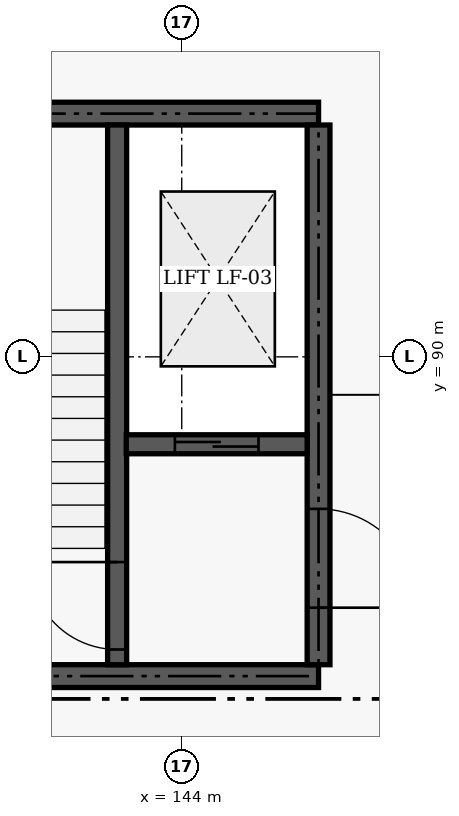
"""IFC4 building model, lengths in metres.
Left out: names, types, materials, properties, quantities, classifications, styles, units other than length and angle.
Written with IfcOpenShell. Run it as: python <this file> out.ifc"""

import sys

from ifc_helpers import new_model, si_unit, direction, frame, frame_2d, origin, place, context, subcontext, project, spatial, rectangle, extrude, element, fill, save


model = new_model("IFC4")
c1 = context("Model", 3, precision=1e-05, world=origin(), true_north=direction((0.0, 1.0)))
c2 = subcontext(c1, "Body", "Model", "MODEL_VIEW")
j1 = project(units=[si_unit("LENGTHUNIT", "METRE"), si_unit("PLANEANGLEUNIT", "RADIAN")], contexts=[c1])
p1 = place(None, origin())
s1 = spatial("IfcSite", under=j1, at=p1, CompositionType="ELEMENT")
p2 = place(p1, origin())
s2 = spatial("IfcBuilding", under=s1, at=p2, CompositionType="ELEMENT")
p3 = place(p2, frame((0.0, 0.0, 5.4)))
s3 = spatial("IfcBuildingStorey", under=s2, at=p3, CompositionType="ELEMENT", Elevation=5.4)
for number, where, z_axis, x_axis in (
    (1, (139.2, 85.8, 0.0), (0.0, 0.0, 1.0), (1.0, 0.0, 0.0)),
    (2, (139.2, 93.2, 0.0), (0.0, 0.0, 1.0), (1.0, 0.0, 0.0)),
):
    element("IfcWall", number, at=place(p3, frame(where, z_axis=z_axis, x_axis=x_axis)), inside=s3, PredefinedType="SHEAR", context=c2, shape_type="SweptSolid", body=[
        extrude(rectangle(XDim=6.6, YDim=0.3, at=frame_2d((3.3, 0.0))), origin(), (0.0, 0.0, 1.0), 4.2),
    ])
p4 = place(p3, frame((145.8, 85.95, 0.0), z_axis=(0.0, 0.0, 1.0), x_axis=(0.0, 1.0, 0.0)))
e3 = element("IfcWall", 3, at=p4, inside=s3, PredefinedType="SHEAR", context=c2, shape_type="SweptSolid", body=[
    extrude(rectangle(XDim=7.1, YDim=0.3, at=frame_2d((3.55, 0.0))), origin(), (0.0, 0.0, 1.0), 4.2),
])
p5 = place(p4, frame((0.75, 0.0, 0.0)))
e4 = element("IfcOpeningElement", 4, at=p5, cuts=e3, PredefinedType="OPENING", context=c2, shape_type="SweptSolid", body=[
    extrude(rectangle(XDim=1.3, YDim=2.15, at=frame_2d((0.65, 1.075))), frame((0.0, 0.16, 0.0), z_axis=(0.0, -1.0, 0.0), x_axis=(1.0, 0.0, 0.0)), (0.0, 0.0, 1.0), 0.32),
])
p6 = place(p3, frame((143.15, 85.95, 0.0), z_axis=(0.0, 0.0, 1.0), x_axis=(0.0, 1.0, 0.0)))
e5 = element("IfcWall", 5, at=p6, inside=s3, PredefinedType="SHEAR", context=c2, shape_type="SweptSolid", body=[
    extrude(rectangle(XDim=7.1, YDim=0.25, at=frame_2d((3.55, 0.0))), origin(), (0.0, 0.0, 1.0), 4.2),
])
p7 = place(p6, frame((0.2, 0.0, 0.0)))
e6 = element("IfcOpeningElement", 6, at=p7, cuts=e5, PredefinedType="OPENING", context=c2, shape_type="SweptSolid", body=[
    extrude(rectangle(XDim=1.15, YDim=2.15, at=frame_2d((0.575, 1.075))), frame((0.0, 0.135, 0.0), z_axis=(0.0, -1.0, 0.0), x_axis=(1.0, 0.0, 0.0)), (0.0, 0.0, 1.0), 0.27),
])
p8 = place(p3, frame((143.27, 88.85, 0.0), z_axis=(0.0, 0.0, 1.0), x_axis=(1.0, 0.0, 0.0)))
e7 = element("IfcWall", 7, at=p8, inside=s3, PredefinedType="SHEAR", context=c2, shape_type="SweptSolid", body=[
    extrude(rectangle(XDim=2.38, YDim=0.25, at=frame_2d((1.19, 0.0))), origin(), (0.0, 0.0, 1.0), 4.2),
])
p9 = place(p8, frame((0.64, 0.0, 0.0)))
e8 = element("IfcOpeningElement", 8, at=p9, cuts=e7, PredefinedType="OPENING", context=c2, shape_type="SweptSolid", body=[
    extrude(rectangle(XDim=1.1, YDim=2.15, at=frame_2d((0.55, 1.075))), frame((0.0, 0.135, 0.0), z_axis=(0.0, -1.0, 0.0), x_axis=(1.0, 0.0, 0.0)), (0.0, 0.0, 1.0), 0.27),
])
p10 = place(p5, frame((1.3, 0.0, 0.0), z_axis=(0.0, 0.0, 1.0), x_axis=(-1.0, 0.0, 0.0)))
e9 = element("IfcDoor", 9, at=p10, inside=s3, OperationType="DOUBLE_DOOR_SINGLE_SWING", PredefinedType="DOOR", context=c2, shape_type="SweptSolid", body=[
    extrude(rectangle(XDim=1.3, YDim=2.15, at=frame_2d((0.65, 1.075))), frame((0.0, 0.025, 0.0), z_axis=(0.0, -1.0, 0.0), x_axis=(1.0, 0.0, 0.0)), (0.0, 0.0, 1.0), 0.05),
])
fill(e4, e9)
p11 = place(p7, frame((1.15, 0.0, 0.0), z_axis=(0.0, 0.0, 1.0), x_axis=(-1.0, 0.0, 0.0)))
e10 = element("IfcDoor", 10, at=p11, inside=s3, OperationType="SINGLE_SWING_RIGHT", PredefinedType="DOOR", context=c2, shape_type="SweptSolid", body=[
    extrude(rectangle(XDim=1.15, YDim=2.15, at=frame_2d((0.575, 1.075))), frame((0.0, 0.025, 0.0), z_axis=(0.0, -1.0, 0.0), x_axis=(1.0, 0.0, 0.0)), (0.0, 0.0, 1.0), 0.05),
])
fill(e6, e10)
p12 = place(p9, origin())
e11 = element("IfcDoor", 11, at=p12, inside=s3, OperationType="SLIDING_TO_LEFT", PredefinedType="DOOR", context=c2, shape_type="SweptSolid", body=[
    extrude(rectangle(XDim=1.1, YDim=2.15, at=frame_2d((0.55, 1.075))), frame((0.0, 0.025, 0.0), z_axis=(0.0, -1.0, 0.0), x_axis=(1.0, 0.0, 0.0)), (0.0, 0.0, 1.0), 0.05),
])
fill(e8, e11)
save(model, sys.argv[1])
